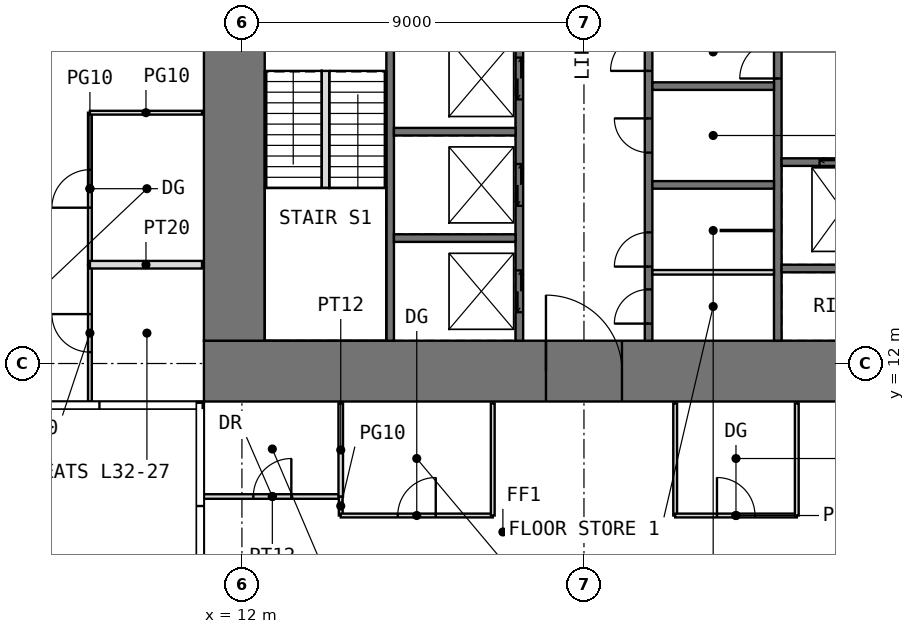
"""IFC4 building model, lengths in metres.
Left out: names, types, materials, properties, quantities, classifications, styles, units other than length and angle.
Written with IfcOpenShell. Run it as: python <this file> out.ifc"""

import sys

from ifc_helpers import new_model, si_unit, direction, frame, frame_2d, origin, place, context, subcontext, project, spatial, rectangle, extrude, element, fill, save


model = new_model("IFC4")
c1 = context("Model", 3, precision=1e-05, world=origin(), true_north=direction((0.0, 1.0)))
c2 = subcontext(c1, "Body", "Model", "MODEL_VIEW")
j1 = project(units=[si_unit("LENGTHUNIT", "METRE"), si_unit("PLANEANGLEUNIT", "RADIAN")], contexts=[c1])
p1 = place(None, origin())
s1 = spatial("IfcSite", under=j1, at=p1, CompositionType="ELEMENT")
p2 = place(p1, origin())
s2 = spatial("IfcBuilding", under=s1, at=p2, CompositionType="ELEMENT")
p3 = place(p2, frame((0.0, 0.0, 136.5)))
s3 = spatial("IfcBuildingStorey", under=s2, at=p3, CompositionType="ELEMENT", Elevation=136.5)
p4 = place(p3, frame((11.0, 11.8, -0.05), z_axis=(0.0, 0.0, 1.0), x_axis=(1.0, 0.0, 0.0)))
e1 = element("IfcWall", 1, at=p4, inside=s3, PredefinedType="SHEAR", context=c2, shape_type="SweptSolid", body=[
    extrude(rectangle(XDim=20.0, YDim=1.6, at=frame_2d((10.0, 0.0))), origin(), (0.0, 0.0, 1.0), 4.0),
])
p5 = place(p4, frame((9.0, 0.0, 0.05)))
e2 = element("IfcOpeningElement", 2, at=p5, cuts=e1, PredefinedType="OPENING", context=c2, shape_type="SweptSolid", body=[
    extrude(rectangle(XDim=2.0, YDim=2.2, at=frame_2d((1.0, 1.1))), frame((0.0, 0.81, 0.0), z_axis=(0.0, -1.0, 0.0), x_axis=(1.0, 0.0, 0.0)), (0.0, 0.0, 1.0), 1.62),
])
p6 = place(p3, frame((11.8, 12.6, -0.05), z_axis=(0.0, 0.0, 1.0), x_axis=(0.0, 1.0, 0.0)))
e3 = element("IfcWall", 3, at=p6, inside=s3, PredefinedType="SHEAR", context=c2, shape_type="SweptSolid", body=[
    extrude(rectangle(XDim=16.8, YDim=1.6, at=frame_2d((8.4, 0.0))), origin(), (0.0, 0.0, 1.0), 4.0),
])
p7 = place(p6, frame((9.9, 0.0, 0.05)))
e4 = element("IfcOpeningElement", 4, at=p7, cuts=e3, PredefinedType="OPENING", context=c2, shape_type="SweptSolid", body=[
    extrude(rectangle(XDim=1.0, YDim=2.2, at=frame_2d((0.5, 1.1))), frame((0.0, 0.81, 0.0), z_axis=(0.0, -1.0, 0.0), x_axis=(1.0, 0.0, 0.0)), (0.0, 0.0, 1.0), 1.62),
])
p8 = place(p3, frame((15.9, 12.6, -0.05), z_axis=(0.0, 0.0, 1.0), x_axis=(0.0, 1.0, 0.0)))
e5 = element("IfcWall", 5, at=p8, inside=s3, PredefinedType="SHEAR", context=c2, shape_type="SweptSolid", body=[
    extrude(rectangle(XDim=16.8, YDim=0.2, at=frame_2d((8.4, 0.0))), origin(), (0.0, 0.0, 1.0), 4.0),
])
p9 = place(p8, frame((8.9, 0.0, 0.05)))
e6 = element("IfcOpeningElement", 6, at=p9, cuts=e5, PredefinedType="OPENING", context=c2, shape_type="SweptSolid", body=[
    extrude(rectangle(XDim=1.0, YDim=2.2, at=frame_2d((0.5, 1.1))), frame((0.0, 0.11, 0.0), z_axis=(0.0, -1.0, 0.0), x_axis=(1.0, 0.0, 0.0)), (0.0, 0.0, 1.0), 0.22),
])
p10 = place(p3, frame((19.3, 12.6, -0.05), z_axis=(0.0, 0.0, 1.0), x_axis=(0.0, 1.0, 0.0)))
e7 = element("IfcWall", 7, at=p10, inside=s3, PredefinedType="SHEAR", context=c2, shape_type="SweptSolid", body=[
    extrude(rectangle(XDim=16.8, YDim=0.2, at=frame_2d((8.4, 0.0))), origin(), (0.0, 0.0, 1.0), 4.0),
])
p11 = place(p10, frame((8.7, 0.0, 0.05)))
e8 = element("IfcOpeningElement", 8, at=p11, cuts=e7, PredefinedType="OPENING", context=c2, shape_type="SweptSolid", body=[
    extrude(rectangle(XDim=1.0, YDim=2.2, at=frame_2d((0.5, 1.1))), frame((0.0, 0.11, 0.0), z_axis=(0.0, -1.0, 0.0), x_axis=(1.0, 0.0, 0.0)), (0.0, 0.0, 1.0), 0.22),
])
p12 = place(p10, frame((10.85, 0.0, 0.05)))
e9 = element("IfcOpeningElement", 9, at=p12, cuts=e7, PredefinedType="OPENING", context=c2, shape_type="SweptSolid", body=[
    extrude(rectangle(XDim=0.9, YDim=2.2, at=frame_2d((0.45, 1.1))), frame((0.0, 0.11, 0.0), z_axis=(0.0, -1.0, 0.0), x_axis=(1.0, 0.0, 0.0)), (0.0, 0.0, 1.0), 0.22),
])
p13 = place(p10, frame((13.3, 0.0, 0.05)))
e10 = element("IfcOpeningElement", 10, at=p13, cuts=e7, PredefinedType="OPENING", context=c2, shape_type="SweptSolid", body=[
    extrude(rectangle(XDim=1.0, YDim=2.2, at=frame_2d((0.5, 1.1))), frame((0.0, 0.11, 0.0), z_axis=(0.0, -1.0, 0.0), x_axis=(1.0, 0.0, 0.0)), (0.0, 0.0, 1.0), 0.22),
])
p14 = place(p10, frame((15.55, 0.0, 0.05)))
e11 = element("IfcOpeningElement", 11, at=p14, cuts=e7, PredefinedType="OPENING", context=c2, shape_type="SweptSolid", body=[
    extrude(rectangle(XDim=0.9, YDim=2.2, at=frame_2d((0.45, 1.1))), frame((0.0, 0.11, 0.0), z_axis=(0.0, -1.0, 0.0), x_axis=(1.0, 0.0, 0.0)), (0.0, 0.0, 1.0), 0.22),
])
p15 = place(p10, frame((0.75, 0.0, 0.05)))
e12 = element("IfcOpeningElement", 12, at=p15, cuts=e7, PredefinedType="OPENING", context=c2, shape_type="SweptSolid", body=[
    extrude(rectangle(XDim=1.1, YDim=2.2, at=frame_2d((0.55, 1.1))), frame((0.0, 0.11, 0.0), z_axis=(0.0, -1.0, 0.0), x_axis=(1.0, 0.0, 0.0)), (0.0, 0.0, 1.0), 0.22),
])
p16 = place(p10, frame((3.55, 0.0, 0.05)))
e13 = element("IfcOpeningElement", 13, at=p16, cuts=e7, PredefinedType="OPENING", context=c2, shape_type="SweptSolid", body=[
    extrude(rectangle(XDim=1.1, YDim=2.2, at=frame_2d((0.55, 1.1))), frame((0.0, 0.11, 0.0), z_axis=(0.0, -1.0, 0.0), x_axis=(1.0, 0.0, 0.0)), (0.0, 0.0, 1.0), 0.22),
])
p17 = place(p10, frame((6.35, 0.0, 0.05)))
e14 = element("IfcOpeningElement", 14, at=p17, cuts=e7, PredefinedType="OPENING", context=c2, shape_type="SweptSolid", body=[
    extrude(rectangle(XDim=1.1, YDim=2.2, at=frame_2d((0.55, 1.1))), frame((0.0, 0.11, 0.0), z_axis=(0.0, -1.0, 0.0), x_axis=(1.0, 0.0, 0.0)), (0.0, 0.0, 1.0), 0.22),
])
p18 = place(p3, frame((22.7, 12.6, -0.05), z_axis=(0.0, 0.0, 1.0), x_axis=(0.0, 1.0, 0.0)))
e15 = element("IfcWall", 15, at=p18, inside=s3, PredefinedType="SHEAR", context=c2, shape_type="SweptSolid", body=[
    extrude(rectangle(XDim=16.8, YDim=0.2, at=frame_2d((8.4, 0.0))), origin(), (0.0, 0.0, 1.0), 4.0),
])
p19 = place(p18, frame((0.45, 0.0, 0.05)))
e16 = element("IfcOpeningElement", 16, at=p19, cuts=e15, PredefinedType="OPENING", context=c2, shape_type="SweptSolid", body=[
    extrude(rectangle(XDim=0.9, YDim=2.2, at=frame_2d((0.45, 1.1))), frame((0.0, 0.11, 0.0), z_axis=(0.0, -1.0, 0.0), x_axis=(1.0, 0.0, 0.0)), (0.0, 0.0, 1.0), 0.22),
])
p20 = place(p18, frame((7.1, 0.0, 0.05)))
e17 = element("IfcOpeningElement", 17, at=p20, cuts=e15, PredefinedType="OPENING", context=c2, shape_type="SweptSolid", body=[
    extrude(rectangle(XDim=1.0, YDim=2.2, at=frame_2d((0.5, 1.1))), frame((0.0, 0.11, 0.0), z_axis=(0.0, -1.0, 0.0), x_axis=(1.0, 0.0, 0.0)), (0.0, 0.0, 1.0), 0.22),
])
p21 = place(p18, frame((1.95, 0.0, 0.05)))
e18 = element("IfcOpeningElement", 18, at=p21, cuts=e15, PredefinedType="OPENING", context=c2, shape_type="SweptSolid", body=[
    extrude(rectangle(XDim=0.9, YDim=2.2, at=frame_2d((0.45, 1.1))), frame((0.0, 0.11, 0.0), z_axis=(0.0, -1.0, 0.0), x_axis=(1.0, 0.0, 0.0)), (0.0, 0.0, 1.0), 0.22),
])
p22 = place(p18, frame((4.95, 0.0, 0.05)))
e19 = element("IfcOpeningElement", 19, at=p22, cuts=e15, PredefinedType="OPENING", context=c2, shape_type="SweptSolid", body=[
    extrude(rectangle(XDim=0.9, YDim=2.2, at=frame_2d((0.45, 1.1))), frame((0.0, 0.11, 0.0), z_axis=(0.0, -1.0, 0.0), x_axis=(1.0, 0.0, 0.0)), (0.0, 0.0, 1.0), 0.22),
])
p23 = place(p18, frame((9.4, 0.0, 0.05)))
e20 = element("IfcOpeningElement", 20, at=p23, cuts=e15, PredefinedType="OPENING", context=c2, shape_type="SweptSolid", body=[
    extrude(rectangle(XDim=1.0, YDim=2.2, at=frame_2d((0.5, 1.1))), frame((0.0, 0.11, 0.0), z_axis=(0.0, -1.0, 0.0), x_axis=(1.0, 0.0, 0.0)), (0.0, 0.0, 1.0), 0.22),
])
p24 = place(p3, frame((26.1, 12.6, -0.05), z_axis=(0.0, 0.0, 1.0), x_axis=(0.0, 1.0, 0.0)))
e21 = element("IfcWall", 21, at=p24, inside=s3, PredefinedType="SHEAR", context=c2, shape_type="SweptSolid", body=[
    extrude(rectangle(XDim=16.8, YDim=0.2, at=frame_2d((8.4, 0.0))), origin(), (0.0, 0.0, 1.0), 4.0),
])
p25 = place(p24, frame((6.9, 0.0, 0.05)))
e22 = element("IfcOpeningElement", 22, at=p25, cuts=e21, PredefinedType="OPENING", context=c2, shape_type="SweptSolid", body=[
    extrude(rectangle(XDim=1.0, YDim=2.2, at=frame_2d((0.5, 1.1))), frame((0.0, 0.11, 0.0), z_axis=(0.0, -1.0, 0.0), x_axis=(1.0, 0.0, 0.0)), (0.0, 0.0, 1.0), 0.22),
])
for number, where, z_axis, x_axis in (
    (23, (16.0, 15.3, -0.05), (0.0, 0.0, 1.0), (1.0, 0.0, 0.0)),
    (24, (16.0, 18.1, -0.05), (0.0, 0.0, 1.0), (1.0, 0.0, 0.0)),
    (25, (22.8, 16.7, -0.05), (0.0, 0.0, 1.0), (1.0, 0.0, 0.0)),
    (26, (22.8, 19.3, -0.05), (0.0, 0.0, 1.0), (1.0, 0.0, 0.0)),
    (27, (26.2, 14.5, -0.05), (0.0, 0.0, 1.0), (1.0, 0.0, 0.0)),
):
    element("IfcWall", number, at=place(p3, frame(where, z_axis=z_axis, x_axis=x_axis)), inside=s3, PredefinedType="SHEAR", context=c2, shape_type="SweptSolid", body=[
        extrude(rectangle(XDim=3.2, YDim=0.2, at=frame_2d((1.6, 0.0))), origin(), (0.0, 0.0, 1.0), 4.0),
    ])
p26 = place(p3, frame((26.2, 17.3, -0.05), z_axis=(0.0, 0.0, 1.0), x_axis=(1.0, 0.0, 0.0)))
e28 = element("IfcWall", 28, at=p26, inside=s3, PredefinedType="SHEAR", context=c2, shape_type="SweptSolid", body=[
    extrude(rectangle(XDim=3.2, YDim=0.2, at=frame_2d((1.6, 0.0))), origin(), (0.0, 0.0, 1.0), 4.0),
])
p27 = place(p26, frame((1.0, 0.0, 0.05)))
e29 = element("IfcOpeningElement", 29, at=p27, cuts=e28, PredefinedType="OPENING", context=c2, shape_type="SweptSolid", body=[
    extrude(rectangle(XDim=1.2, YDim=2.2, at=frame_2d((0.6, 1.1))), frame((0.0, 0.11, 0.0), z_axis=(0.0, -1.0, 0.0), x_axis=(1.0, 0.0, 0.0)), (0.0, 0.0, 1.0), 0.22),
])
p28 = place(p3, frame((22.8, 14.4, 0.0), z_axis=(0.0, 0.0, 1.0), x_axis=(1.0, 0.0, 0.0)))
e30 = element("IfcWall", 30, at=p28, inside=s3, PredefinedType="PARTITIONING", context=c2, shape_type="SweptSolid", body=[
    extrude(rectangle(XDim=3.2, YDim=0.12, at=frame_2d((1.6, 0.0))), origin(), (0.0, 0.0, 1.0), 3.75),
])
p29 = place(p3, frame((24.6, 15.5, 0.0), z_axis=(0.0, 0.0, 1.0), x_axis=(1.0, 0.0, 0.0)))
e31 = element("IfcWall", 31, at=p29, inside=s3, PredefinedType="PARTITIONING", context=c2, shape_type="SweptSolid", body=[
    extrude(rectangle(XDim=1.4, YDim=0.03, at=frame_2d((0.7, 0.0))), origin(), (0.0, 0.0, 1.0), 3.75),
])
p30 = place(p3, frame((8.0, 11.0, 0.0), z_axis=(0.0, 0.0, 1.0), x_axis=(0.0, 1.0, 0.0)))
e32 = element("IfcWall", 32, at=p30, inside=s3, PredefinedType="PARTITIONING", context=c2, shape_type="SweptSolid", body=[
    extrude(rectangle(XDim=3.6, YDim=0.1, at=frame_2d((1.8, 0.0))), origin(), (0.0, 0.0, 1.0), 3.75),
])
p31 = place(p30, frame((1.3, 0.0, 0.0)))
e33 = element("IfcOpeningElement", 33, at=p31, cuts=e32, PredefinedType="OPENING", context=c2, shape_type="SweptSolid", body=[
    extrude(rectangle(XDim=1.0, YDim=2.4, at=frame_2d((0.5, 1.2))), frame((0.0, 0.06, 0.0), z_axis=(0.0, -1.0, 0.0), x_axis=(1.0, 0.0, 0.0)), (0.0, 0.0, 1.0), 0.12),
])
p32 = place(p3, frame((8.0, 14.6, 0.0), z_axis=(0.0, 0.0, 1.0), x_axis=(0.0, 1.0, 0.0)))
e34 = element("IfcWall", 34, at=p32, inside=s3, PredefinedType="PARTITIONING", context=c2, shape_type="SweptSolid", body=[
    extrude(rectangle(XDim=4.0, YDim=0.1, at=frame_2d((2.0, 0.0))), origin(), (0.0, 0.0, 1.0), 3.75),
])
p33 = place(p32, frame((1.5, 0.0, 0.0)))
e35 = element("IfcOpeningElement", 35, at=p33, cuts=e34, PredefinedType="OPENING", context=c2, shape_type="SweptSolid", body=[
    extrude(rectangle(XDim=1.0, YDim=2.4, at=frame_2d((0.5, 1.2))), frame((0.0, 0.06, 0.0), z_axis=(0.0, -1.0, 0.0), x_axis=(1.0, 0.0, 0.0)), (0.0, 0.0, 1.0), 0.12),
])
p34 = place(p3, frame((8.0, 14.6, 0.0), z_axis=(0.0, 0.0, 1.0), x_axis=(1.0, 0.0, 0.0)))
e36 = element("IfcWall", 36, at=p34, inside=s3, PredefinedType="PARTITIONING", context=c2, shape_type="SweptSolid", body=[
    extrude(rectangle(XDim=2.95, YDim=0.2, at=frame_2d((1.475, 0.0))), origin(), (0.0, 0.0, 1.0), 3.75),
])
p35 = place(p3, frame((8.0, 18.6, 0.0), z_axis=(0.0, 0.0, 1.0), x_axis=(1.0, 0.0, 0.0)))
e37 = element("IfcWall", 37, at=p35, inside=s3, PredefinedType="PARTITIONING", context=c2, shape_type="SweptSolid", body=[
    extrude(rectangle(XDim=2.95, YDim=0.1, at=frame_2d((1.475, 0.0))), origin(), (0.0, 0.0, 1.0), 3.75),
])
p36 = place(p3, frame((11.0, 8.5, 0.0), z_axis=(0.0, 0.0, 1.0), x_axis=(1.0, 0.0, 0.0)))
e38 = element("IfcWall", 38, at=p36, inside=s3, PredefinedType="PARTITIONING", context=c2, shape_type="SweptSolid", body=[
    extrude(rectangle(XDim=3.6, YDim=0.12, at=frame_2d((1.8, 0.0))), origin(), (0.0, 0.0, 1.0), 3.75),
])
p37 = place(p36, frame((1.3, 0.0, 0.0)))
e39 = element("IfcOpeningElement", 39, at=p37, cuts=e38, PredefinedType="OPENING", context=c2, shape_type="SweptSolid", body=[
    extrude(rectangle(XDim=1.0, YDim=2.2, at=frame_2d((0.5, 1.1))), frame((0.0, 0.07, 0.0), z_axis=(0.0, -1.0, 0.0), x_axis=(1.0, 0.0, 0.0)), (0.0, 0.0, 1.0), 0.14),
])
p38 = place(p3, frame((14.6, 8.0, 0.0), z_axis=(0.0, 0.0, 1.0), x_axis=(0.0, 1.0, 0.0)))
e40 = element("IfcWall", 40, at=p38, inside=s3, PredefinedType="PARTITIONING", context=c2, shape_type="SweptSolid", body=[
    extrude(rectangle(XDim=0.5, YDim=0.1, at=frame_2d((0.25, 0.0))), origin(), (0.0, 0.0, 1.0), 3.75),
])
p39 = place(p3, frame((14.6, 8.0, 0.0), z_axis=(0.0, 0.0, 1.0), x_axis=(1.0, 0.0, 0.0)))
e41 = element("IfcWall", 41, at=p39, inside=s3, PredefinedType="PARTITIONING", context=c2, shape_type="SweptSolid", body=[
    extrude(rectangle(XDim=4.0, YDim=0.1, at=frame_2d((2.0, 0.0))), origin(), (0.0, 0.0, 1.0), 3.75),
])
p40 = place(p39, frame((1.5, 0.0, 0.0)))
e42 = element("IfcOpeningElement", 42, at=p40, cuts=e41, PredefinedType="OPENING", context=c2, shape_type="SweptSolid", body=[
    extrude(rectangle(XDim=1.0, YDim=2.4, at=frame_2d((0.5, 1.2))), frame((0.0, 0.06, 0.0), z_axis=(0.0, -1.0, 0.0), x_axis=(1.0, 0.0, 0.0)), (0.0, 0.0, 1.0), 0.12),
])
p41 = place(p3, frame((14.6, 8.5, 0.0), z_axis=(0.0, 0.0, 1.0), x_axis=(0.0, 1.0, 0.0)))
e43 = element("IfcWall", 43, at=p41, inside=s3, PredefinedType="PARTITIONING", context=c2, shape_type="SweptSolid", body=[
    extrude(rectangle(XDim=2.45, YDim=0.12, at=frame_2d((1.225, 0.0))), origin(), (0.0, 0.0, 1.0), 3.75),
])
for number, where, z_axis, x_axis in (
    (44, (18.6, 8.0, 0.0), (0.0, 0.0, 1.0), (0.0, 1.0, 0.0)),
    (45, (23.4, 8.0, 0.0), (0.0, 0.0, 1.0), (0.0, 1.0, 0.0)),
):
    element("IfcWall", number, at=place(p3, frame(where, z_axis=z_axis, x_axis=x_axis)), inside=s3, PredefinedType="PARTITIONING", context=c2, shape_type="SweptSolid", body=[
        extrude(rectangle(XDim=2.95, YDim=0.1, at=frame_2d((1.475, 0.0))), origin(), (0.0, 0.0, 1.0), 3.75),
    ])
p42 = place(p3, frame((23.4, 8.0, 0.0), z_axis=(0.0, 0.0, 1.0), x_axis=(1.0, 0.0, 0.0)))
e46 = element("IfcWall", 46, at=p42, inside=s3, PredefinedType="PARTITIONING", context=c2, shape_type="SweptSolid", body=[
    extrude(rectangle(XDim=3.2, YDim=0.1, at=frame_2d((1.6, 0.0))), origin(), (0.0, 0.0, 1.0), 3.75),
])
p43 = place(p42, frame((1.1, 0.0, 0.0)))
e47 = element("IfcOpeningElement", 47, at=p43, cuts=e46, PredefinedType="OPENING", context=c2, shape_type="SweptSolid", body=[
    extrude(rectangle(XDim=1.0, YDim=2.4, at=frame_2d((0.5, 1.2))), frame((0.0, 0.06, 0.0), z_axis=(0.0, -1.0, 0.0), x_axis=(1.0, 0.0, 0.0)), (0.0, 0.0, 1.0), 0.12),
])
p44 = place(p3, frame((26.6, 8.0, 0.0), z_axis=(0.0, 0.0, 1.0), x_axis=(0.0, 1.0, 0.0)))
e48 = element("IfcWall", 48, at=p44, inside=s3, PredefinedType="PARTITIONING", context=c2, shape_type="SweptSolid", body=[
    extrude(rectangle(XDim=2.95, YDim=0.1, at=frame_2d((1.475, 0.0))), origin(), (0.0, 0.0, 1.0), 3.75),
])
p45 = place(p3, frame((14.2, 16.62, 0.0), z_axis=(0.0, 0.0, 1.0), x_axis=(0.0, 1.0, 0.0)))
e49 = element("IfcWall", 49, at=p45, inside=s3, PredefinedType="PARTITIONING", context=c2, shape_type="SweptSolid", body=[
    extrude(rectangle(XDim=3.08, YDim=0.2, at=frame_2d((1.54, 0.0))), origin(), (0.0, 0.0, 1.0), 4.0),
])
p46 = place(p5, origin())
e50 = element("IfcDoor", 50, at=p46, inside=s3, OperationType="DOUBLE_DOOR_SINGLE_SWING", PredefinedType="DOOR", context=c2, shape_type="SweptSolid", body=[
    extrude(rectangle(XDim=2.0, YDim=2.2, at=frame_2d((1.0, 1.1))), frame((0.0, 0.025, 0.0), z_axis=(0.0, -1.0, 0.0), x_axis=(1.0, 0.0, 0.0)), (0.0, 0.0, 1.0), 0.05),
])
fill(e2, e50)
p47 = place(p19, origin())
e51 = element("IfcDoor", 51, at=p47, inside=s3, OperationType="SINGLE_SWING_LEFT", PredefinedType="DOOR", context=c2, shape_type="SweptSolid", body=[
    extrude(rectangle(XDim=0.9, YDim=2.2, at=frame_2d((0.45, 1.1))), frame((0.0, 0.025, 0.0), z_axis=(0.0, -1.0, 0.0), x_axis=(1.0, 0.0, 0.0)), (0.0, 0.0, 1.0), 0.05),
])
fill(e16, e51)
p48 = place(p25, origin())
e52 = element("IfcDoor", 52, at=p48, inside=s3, OperationType="SINGLE_SWING_LEFT", PredefinedType="DOOR", context=c2, shape_type="SweptSolid", body=[
    extrude(rectangle(XDim=1.0, YDim=2.2, at=frame_2d((0.5, 1.1))), frame((0.0, 0.025, 0.0), z_axis=(0.0, -1.0, 0.0), x_axis=(1.0, 0.0, 0.0)), (0.0, 0.0, 1.0), 0.05),
])
fill(e22, e52)
p49 = place(p20, origin())
e53 = element("IfcDoor", 53, at=p49, inside=s3, OperationType="SINGLE_SWING_LEFT", PredefinedType="DOOR", context=c2, shape_type="SweptSolid", body=[
    extrude(rectangle(XDim=1.0, YDim=2.2, at=frame_2d((0.5, 1.1))), frame((0.0, 0.025, 0.0), z_axis=(0.0, -1.0, 0.0), x_axis=(1.0, 0.0, 0.0)), (0.0, 0.0, 1.0), 0.05),
])
fill(e17, e53)
p50 = place(p21, origin())
e54 = element("IfcDoor", 54, at=p50, inside=s3, OperationType="SINGLE_SWING_LEFT", PredefinedType="DOOR", context=c2, shape_type="SweptSolid", body=[
    extrude(rectangle(XDim=0.9, YDim=2.2, at=frame_2d((0.45, 1.1))), frame((0.0, 0.025, 0.0), z_axis=(0.0, -1.0, 0.0), x_axis=(1.0, 0.0, 0.0)), (0.0, 0.0, 1.0), 0.05),
])
fill(e18, e54)
p51 = place(p22, origin())
e55 = element("IfcDoor", 55, at=p51, inside=s3, OperationType="SINGLE_SWING_RIGHT", PredefinedType="DOOR", context=c2, shape_type="SweptSolid", body=[
    extrude(rectangle(XDim=0.9, YDim=2.2, at=frame_2d((0.45, 1.1))), frame((0.0, 0.025, 0.0), z_axis=(0.0, -1.0, 0.0), x_axis=(1.0, 0.0, 0.0)), (0.0, 0.0, 1.0), 0.05),
])
fill(e19, e55)
p52 = place(p37, origin())
e56 = element("IfcDoor", 56, at=p52, inside=s3, OperationType="SINGLE_SWING_RIGHT", PredefinedType="DOOR", context=c2, shape_type="SweptSolid", body=[
    extrude(rectangle(XDim=1.0, YDim=2.2, at=frame_2d((0.5, 1.1))), frame((0.0, 0.025, 0.0), z_axis=(0.0, -1.0, 0.0), x_axis=(1.0, 0.0, 0.0)), (0.0, 0.0, 1.0), 0.05),
])
fill(e39, e56)
p53 = place(p40, origin())
e57 = element("IfcDoor", 57, at=p53, inside=s3, OperationType="SINGLE_SWING_RIGHT", PredefinedType="DOOR", context=c2, shape_type="SweptSolid", body=[
    extrude(rectangle(XDim=1.0, YDim=2.4, at=frame_2d((0.5, 1.2))), frame((0.0, 0.025, 0.0), z_axis=(0.0, -1.0, 0.0), x_axis=(1.0, 0.0, 0.0)), (0.0, 0.0, 1.0), 0.05),
])
fill(e42, e57)
p54 = place(p43, origin())
e58 = element("IfcDoor", 58, at=p54, inside=s3, OperationType="SINGLE_SWING_LEFT", PredefinedType="DOOR", context=c2, shape_type="SweptSolid", body=[
    extrude(rectangle(XDim=1.0, YDim=2.4, at=frame_2d((0.5, 1.2))), frame((0.0, 0.025, 0.0), z_axis=(0.0, -1.0, 0.0), x_axis=(1.0, 0.0, 0.0)), (0.0, 0.0, 1.0), 0.05),
])
fill(e47, e58)
p55 = place(p31, origin())
e59 = element("IfcDoor", 59, at=p55, inside=s3, OperationType="SINGLE_SWING_RIGHT", PredefinedType="DOOR", context=c2, shape_type="SweptSolid", body=[
    extrude(rectangle(XDim=1.0, YDim=2.4, at=frame_2d((0.5, 1.2))), frame((0.0, 0.025, 0.0), z_axis=(0.0, -1.0, 0.0), x_axis=(1.0, 0.0, 0.0)), (0.0, 0.0, 1.0), 0.05),
])
fill(e33, e59)
p56 = place(p33, origin())
e60 = element("IfcDoor", 60, at=p56, inside=s3, OperationType="SINGLE_SWING_LEFT", PredefinedType="DOOR", context=c2, shape_type="SweptSolid", body=[
    extrude(rectangle(XDim=1.0, YDim=2.4, at=frame_2d((0.5, 1.2))), frame((0.0, 0.025, 0.0), z_axis=(0.0, -1.0, 0.0), x_axis=(1.0, 0.0, 0.0)), (0.0, 0.0, 1.0), 0.05),
])
fill(e35, e60)
p57 = place(p15, origin())
e61 = element("IfcDoor", 61, at=p57, inside=s3, OperationType="DOUBLE_DOOR_SLIDING", PredefinedType="DOOR", context=c2, shape_type="SweptSolid", body=[
    extrude(rectangle(XDim=1.1, YDim=2.2, at=frame_2d((0.55, 1.1))), frame((0.0, 0.025, 0.0), z_axis=(0.0, -1.0, 0.0), x_axis=(1.0, 0.0, 0.0)), (0.0, 0.0, 1.0), 0.05),
])
fill(e12, e61)
p58 = place(p16, origin())
e62 = element("IfcDoor", 62, at=p58, inside=s3, OperationType="DOUBLE_DOOR_SLIDING", PredefinedType="DOOR", context=c2, shape_type="SweptSolid", body=[
    extrude(rectangle(XDim=1.1, YDim=2.2, at=frame_2d((0.55, 1.1))), frame((0.0, 0.025, 0.0), z_axis=(0.0, -1.0, 0.0), x_axis=(1.0, 0.0, 0.0)), (0.0, 0.0, 1.0), 0.05),
])
fill(e13, e62)
p59 = place(p17, origin())
e63 = element("IfcDoor", 63, at=p59, inside=s3, OperationType="DOUBLE_DOOR_SLIDING", PredefinedType="DOOR", context=c2, shape_type="SweptSolid", body=[
    extrude(rectangle(XDim=1.1, YDim=2.2, at=frame_2d((0.55, 1.1))), frame((0.0, 0.025, 0.0), z_axis=(0.0, -1.0, 0.0), x_axis=(1.0, 0.0, 0.0)), (0.0, 0.0, 1.0), 0.05),
])
fill(e14, e63)
p60 = place(p27, origin())
e64 = element("IfcDoor", 64, at=p60, inside=s3, OperationType="DOUBLE_DOOR_SLIDING", PredefinedType="DOOR", context=c2, shape_type="SweptSolid", body=[
    extrude(rectangle(XDim=1.2, YDim=2.2, at=frame_2d((0.6, 1.1))), frame((0.0, 0.025, 0.0), z_axis=(0.0, -1.0, 0.0), x_axis=(1.0, 0.0, 0.0)), (0.0, 0.0, 1.0), 0.05),
])
fill(e29, e64)
save(model, sys.argv[1])
